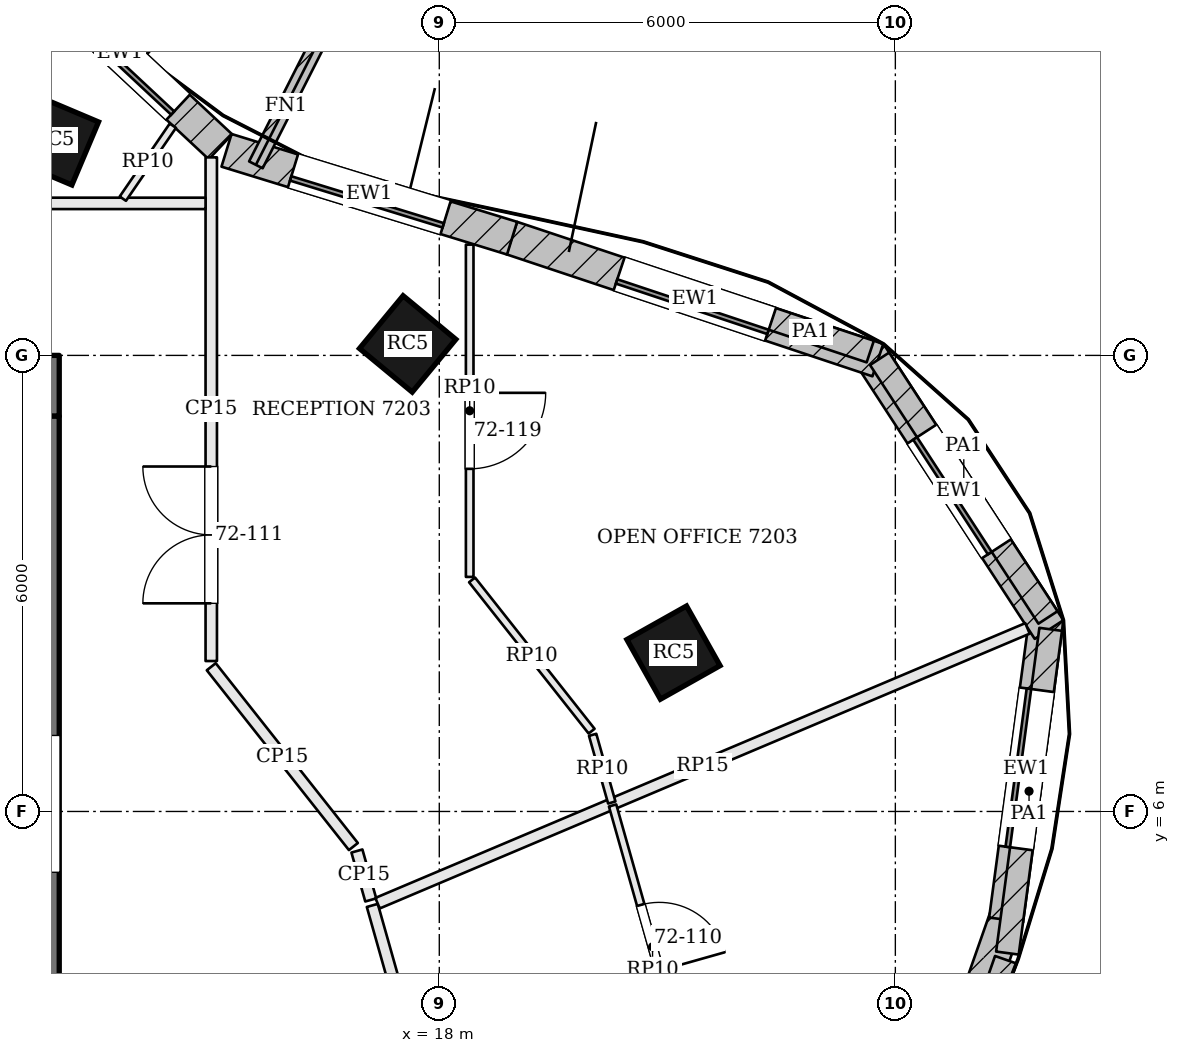
"""IFC4 building model, lengths in metres.
Left out: names, types, materials, properties, quantities, classifications, styles, units other than length and angle.
Written with IfcOpenShell. Run it as: python <this file> out.ifc"""

import sys

from ifc_helpers import new_model, si_unit, direction, frame, frame_2d, origin, origin_2d, place, context, subcontext, project, spatial, rectangle, extrude, element, fill, save


model = new_model("IFC4")
c1 = context("Model", 3, precision=1e-05, world=origin(), true_north=direction((0.0, 1.0)))
c2 = subcontext(c1, "Body", "Model", "MODEL_VIEW")
j1 = project(units=[si_unit("LENGTHUNIT", "METRE"), si_unit("PLANEANGLEUNIT", "RADIAN")], contexts=[c1])
p1 = place(None, origin())
s1 = spatial("IfcSite", under=j1, at=p1, CompositionType="ELEMENT")
p2 = place(p1, origin())
s2 = spatial("IfcBuilding", under=s1, at=p2, CompositionType="ELEMENT")
p3 = place(p2, frame((0.0, 0.0, 292.2)))
s3 = spatial("IfcBuildingStorey", under=s2, at=p3, CompositionType="ELEMENT", Elevation=292.2)
p4 = place(p3, frame((-13.0, 11.6, 0.0), z_axis=(0.0, 0.0, 1.0), x_axis=(1.0, 0.0, 0.0)))
e1 = element("IfcWall", 1, at=p4, inside=s3, PredefinedType="SHEAR", context=c2, shape_type="SweptSolid", body=[
    extrude(rectangle(XDim=26.0, YDim=0.8, at=frame_2d((13.0, 0.0))), origin(), (0.0, 0.0, 1.0), 3.9),
])
p5 = place(p4, frame((9.65, 0.0, 0.0)))
e2 = element("IfcOpeningElement", 2, at=p5, cuts=e1, PredefinedType="OPENING", context=c2, shape_type="SweptSolid", body=[
    extrude(rectangle(XDim=1.0, YDim=2.1, at=frame_2d((0.5, 1.05))), frame((0.0, 0.41, 0.0), z_axis=(0.0, -1.0, 0.0), x_axis=(1.0, 0.0, 0.0)), (0.0, 0.0, 1.0), 0.82),
])
p6 = place(p4, frame((12.675, 0.0, 0.0)))
e3 = element("IfcOpeningElement", 3, at=p6, cuts=e1, PredefinedType="OPENING", context=c2, shape_type="SweptSolid", body=[
    extrude(rectangle(XDim=0.7, YDim=2.1, at=frame_2d((0.35, 1.05))), frame((0.0, 0.41, 0.0), z_axis=(0.0, -1.0, 0.0), x_axis=(1.0, 0.0, 0.0)), (0.0, 0.0, 1.0), 0.82),
])
p7 = place(p4, frame((14.725, 0.0, 0.0)))
e4 = element("IfcOpeningElement", 4, at=p7, cuts=e1, PredefinedType="OPENING", context=c2, shape_type="SweptSolid", body=[
    extrude(rectangle(XDim=0.7, YDim=2.1, at=frame_2d((0.35, 1.05))), frame((0.0, 0.41, 0.0), z_axis=(0.0, -1.0, 0.0), x_axis=(1.0, 0.0, 0.0)), (0.0, 0.0, 1.0), 0.82),
])
p8 = place(p4, frame((16.6, 0.0, 0.0)))
e5 = element("IfcOpeningElement", 5, at=p8, cuts=e1, PredefinedType="OPENING", context=c2, shape_type="SweptSolid", body=[
    extrude(rectangle(XDim=1.0, YDim=2.1, at=frame_2d((0.5, 1.05))), frame((0.0, 0.41, 0.0), z_axis=(0.0, -1.0, 0.0), x_axis=(1.0, 0.0, 0.0)), (0.0, 0.0, 1.0), 0.82),
])
p9 = place(p3, frame((12.6, -2.2, 0.0), z_axis=(0.0, 0.0, 1.0), x_axis=(0.0, 1.0, 0.0)))
e6 = element("IfcWall", 6, at=p9, inside=s3, PredefinedType="SHEAR", context=c2, shape_type="SweptSolid", body=[
    extrude(rectangle(XDim=13.4, YDim=0.8, at=frame_2d((6.7, 0.0))), origin(), (0.0, 0.0, 1.0), 3.9),
])
p10 = place(p9, frame((7.4, 0.0, 0.0)))
e7 = element("IfcOpeningElement", 7, at=p10, cuts=e6, PredefinedType="OPENING", context=c2, shape_type="SweptSolid", body=[
    extrude(rectangle(XDim=1.8, YDim=2.1, at=frame_2d((0.9, 1.05))), frame((0.0, 0.41, 0.0), z_axis=(0.0, -1.0, 0.0), x_axis=(1.0, 0.0, 0.0)), (0.0, 0.0, 1.0), 0.82),
])
for number, where, z_axis, x_axis in (
    (8, (21.081, 8.09, 0.0), (0.0, 0.0, 1.0), (-0.49, 0.872, 0.0)),
    (9, (17.584, 12.151, 0.0), (0.0, 0.0, 1.0), (-0.771, 0.637, 0.0)),
    (10, (12.927, 14.832, 0.0), (0.0, 0.0, 1.0), (-0.921, 0.389, 0.0)),
):
    element("IfcColumn", number, at=place(p3, frame(where, z_axis=z_axis, x_axis=x_axis)), inside=s3, PredefinedType="COLUMN", context=c2, shape_type="SweptSolid", body=[
        extrude(rectangle(XDim=0.9, YDim=0.9, at=origin_2d()), origin(), (0.0, 0.0, 1.0), 3.9),
    ])
p11 = place(p3, frame((23.782, -0.189, 0.0), z_axis=(0.0, 0.0, 1.0), x_axis=(0.330794307703, 0.943702880144, 0.0)))
e11 = element("IfcWall", 11, at=p11, inside=s3, PredefinedType="SOLIDWALL", context=c2, shape_type="SweptSolid", body=[
    extrude(rectangle(XDim=5.095, YDim=0.45, at=frame_2d((2.548, 0.0))), origin(), (0.0, 0.0, 1.0), 3.7),
])
p12 = place(p11, frame((1.498, 0.0, 0.9)))
e12 = element("IfcOpeningElement", 12, at=p12, cuts=e11, PredefinedType="OPENING", context=c2, shape_type="SweptSolid", body=[
    extrude(rectangle(XDim=2.1, YDim=2.3, at=frame_2d((1.05, 1.15))), frame((0.0, 0.235, 0.0), z_axis=(0.0, -1.0, 0.0), x_axis=(1.0, 0.0, 0.0)), (0.0, 0.0, 1.0), 0.47),
])
p13 = place(p3, frame((25.457, 4.575, 0.0), z_axis=(0.0, 0.0, 1.0), x_axis=(0.132475046402, 0.991186340746, 0.0)))
e13 = element("IfcWall", 13, at=p13, inside=s3, PredefinedType="SOLIDWALL", context=c2, shape_type="SweptSolid", body=[
    extrude(rectangle(XDim=4.007, YDim=0.45, at=frame_2d((2.003, 0.0))), origin(), (0.0, 0.0, 1.0), 3.7),
])
p14 = place(p13, frame((0.953, 0.0, 0.9)))
e14 = element("IfcOpeningElement", 14, at=p14, cuts=e13, PredefinedType="OPENING", context=c2, shape_type="SweptSolid", body=[
    extrude(rectangle(XDim=2.1, YDim=2.3, at=frame_2d((1.05, 1.15))), frame((0.0, 0.235, 0.0), z_axis=(0.0, -1.0, 0.0), x_axis=(1.0, 0.0, 0.0)), (0.0, 0.0, 1.0), 0.47),
])
p15 = place(p3, frame((26.022, 8.393, 0.0), z_axis=(0.0, 0.0, 1.0), x_axis=(-0.545637310328, 0.838021435035, 0.0)))
e15 = element("IfcWall", 15, at=p15, inside=s3, PredefinedType="SOLIDWALL", context=c2, shape_type="SweptSolid", body=[
    extrude(rectangle(XDim=4.336, YDim=0.45, at=frame_2d((2.168, 0.0))), origin(), (0.0, 0.0, 1.0), 3.7),
])
p16 = place(p15, frame((1.268, 0.0, 0.9)))
e16 = element("IfcOpeningElement", 16, at=p16, cuts=e15, PredefinedType="OPENING", context=c2, shape_type="SweptSolid", body=[
    extrude(rectangle(XDim=1.8, YDim=2.3, at=frame_2d((0.9, 1.15))), frame((0.0, 0.235, 0.0), z_axis=(0.0, -1.0, 0.0), x_axis=(1.0, 0.0, 0.0)), (0.0, 0.0, 1.0), 0.47),
])
p17 = place(p3, frame((23.77, 11.938, 0.0), z_axis=(0.0, 0.0, 1.0), x_axis=(-0.948673679101, 0.316256621402, 0.0)))
e17 = element("IfcWall", 17, at=p17, inside=s3, PredefinedType="SOLIDWALL", context=c2, shape_type="SweptSolid", body=[
    extrude(rectangle(XDim=5.076, YDim=0.45, at=frame_2d((2.538, 0.0))), origin(), (0.0, 0.0, 1.0), 3.7),
])
p18 = place(p17, frame((1.488, 0.0, 0.9)))
e18 = element("IfcOpeningElement", 18, at=p18, cuts=e17, PredefinedType="OPENING", context=c2, shape_type="SweptSolid", body=[
    extrude(rectangle(XDim=2.1, YDim=2.3, at=frame_2d((1.05, 1.15))), frame((0.0, 0.235, 0.0), z_axis=(0.0, -1.0, 0.0), x_axis=(1.0, 0.0, 0.0)), (0.0, 0.0, 1.0), 0.47),
])
p19 = place(p3, frame((18.958, 13.542, 0.0), z_axis=(0.0, 0.0, 1.0), x_axis=(-0.955792437529, 0.294042201668, 0.0)))
e19 = element("IfcWall", 19, at=p19, inside=s3, PredefinedType="SOLIDWALL", context=c2, shape_type="SweptSolid", body=[
    extrude(rectangle(XDim=3.931, YDim=0.45, at=frame_2d((1.965, 0.0))), origin(), (0.0, 0.0, 1.0), 3.7),
])
p20 = place(p19, frame((0.915, 0.0, 0.9)))
e20 = element("IfcOpeningElement", 20, at=p20, cuts=e19, PredefinedType="OPENING", context=c2, shape_type="SweptSolid", body=[
    extrude(rectangle(XDim=2.1, YDim=2.3, at=frame_2d((1.05, 1.15))), frame((0.0, 0.235, 0.0), z_axis=(0.0, -1.0, 0.0), x_axis=(1.0, 0.0, 0.0)), (0.0, 0.0, 1.0), 0.47),
])
p21 = place(p3, frame((15.121, 14.745, 0.0), z_axis=(0.0, 0.0, 1.0), x_axis=(-0.730618259172, 0.68278617397, 0.0)))
e21 = element("IfcWall", 21, at=p21, inside=s3, PredefinedType="SOLIDWALL", context=c2, shape_type="SweptSolid", body=[
    extrude(rectangle(XDim=3.624, YDim=0.45, at=frame_2d((1.812, 0.0))), origin(), (0.0, 0.0, 1.0), 3.7),
])
p22 = place(p21, frame((0.762, 0.0, 0.9)))
e22 = element("IfcOpeningElement", 22, at=p22, cuts=e21, PredefinedType="OPENING", context=c2, shape_type="SweptSolid", body=[
    extrude(rectangle(XDim=2.1, YDim=2.3, at=frame_2d((1.05, 1.15))), frame((0.0, 0.235, 0.0), z_axis=(0.0, -1.0, 0.0), x_axis=(1.0, 0.0, 0.0)), (0.0, 0.0, 1.0), 0.47),
])
p23 = place(p3, frame((15.587, 14.507, 0.0), z_axis=(0.0, 0.0, 1.0), x_axis=(0.452117231361, 0.89195852432, 0.0)))
e23 = element("IfcWall", 23, at=p23, inside=s3, PredefinedType="SOLIDWALL", context=c2, shape_type="SweptSolid", body=[
    extrude(rectangle(XDim=1.75, YDim=0.2, at=frame_2d((0.875, 0.0))), origin(), (0.0, 0.0, 1.0), 3.7),
])
p24 = place(p3, frame((25.185, 3.285, 3.9), z_axis=(0.0, 0.0, 1.0), x_axis=(0.330927638021, 0.943656133554, 0.0)))
e24 = element("IfcWall", 24, at=p24, inside=s3, PredefinedType="PARAPET", context=c2, shape_type="SweptSolid", body=[
    extrude(rectangle(XDim=0.81, YDim=0.3, at=frame_2d((0.405, 0.0))), origin(), (0.0, 0.0, 1.0), 1.1),
])
p25 = place(p3, frame((25.474, 4.137, 3.9), z_axis=(0.0, 0.0, 1.0), x_axis=(0.132506125812, 0.991182186393, 0.0)))
e25 = element("IfcWall", 25, at=p25, inside=s3, PredefinedType="PARAPET", context=c2, shape_type="SweptSolid", body=[
    extrude(rectangle(XDim=4.297, YDim=0.3, at=frame_2d((2.148, 0.0))), origin(), (0.0, 0.0, 1.0), 1.1),
])
p26 = place(p3, frame((26.008, 8.552, 3.9), z_axis=(0.0, 0.0, 1.0), x_axis=(-0.545634876254, 0.83802301986, 0.0)))
e26 = element("IfcWall", 26, at=p26, inside=s3, PredefinedType="PARAPET", context=c2, shape_type="SweptSolid", body=[
    extrude(rectangle(XDim=4.061, YDim=0.3, at=frame_2d((2.03, 0.0))), origin(), (0.0, 0.0, 1.0), 1.1),
])
p27 = place(p3, frame((23.67, 12.05, 3.9), z_axis=(0.0, 0.0, 1.0), x_axis=(-0.948683298051, 0.316227766017, 0.0)))
e27 = element("IfcWall", 27, at=p27, inside=s3, PredefinedType="PARAPET", context=c2, shape_type="SweptSolid", body=[
    extrude(rectangle(XDim=1.655, YDim=0.3, at=frame_2d((0.827, 0.0))), origin(), (0.0, 0.0, 1.0), 1.1),
])
p28 = place(p3, frame((17.9, 2.0, 0.0), z_axis=(0.0, 0.0, 1.0), x_axis=(-0.271980959701, 0.962302633042, 0.0)))
e28 = element("IfcWall", 28, at=p28, inside=s3, PredefinedType="PARTITIONING", context=c2, shape_type="SweptSolid", body=[
    extrude(rectangle(XDim=2.873, YDim=0.15, at=frame_2d((1.436, 0.0))), origin(), (0.0, 0.0, 1.0), 3.198),
])
p29 = place(p3, frame((25.739, 8.408, 0.0), z_axis=(0.0, 0.0, 1.0), x_axis=(-0.92106014218, -0.389420357052, 0.0)))
e29 = element("IfcWall", 29, at=p29, inside=s3, PredefinedType="PARTITIONING", context=c2, shape_type="SweptSolid", body=[
    extrude(rectangle(XDim=9.284, YDim=0.15, at=frame_2d((4.642, 0.0))), origin(), (0.0, 0.0, 1.0), 3.234),
])
p30 = place(p3, frame((17.098, 4.836, 0.0), z_axis=(0.0, 0.0, 1.0), x_axis=(-0.271971703561, 0.962305249109, 0.0)))
e30 = element("IfcWall", 30, at=p30, inside=s3, PredefinedType="PARTITIONING", context=c2, shape_type="SweptSolid", body=[
    extrude(rectangle(XDim=0.669, YDim=0.15, at=frame_2d((0.334, 0.0))), origin(), (0.0, 0.0, 1.0), 3.198),
])
p31 = place(p3, frame((16.87, 5.539, 0.0), z_axis=(0.0, 0.0, 1.0), x_axis=(-0.620093074114, 0.784528252796, 0.0)))
e31 = element("IfcWall", 31, at=p31, inside=s3, PredefinedType="PARTITIONING", context=c2, shape_type="SweptSolid", body=[
    extrude(rectangle(XDim=3.015, YDim=0.15, at=frame_2d((1.508, 0.0))), origin(), (0.0, 0.0, 1.0), 3.198),
])
p32 = place(p3, frame((15.0, 7.979, 0.0), z_axis=(0.0, 0.0, 1.0), x_axis=(0.0, 1.0, 0.0)))
e32 = element("IfcWall", 32, at=p32, inside=s3, PredefinedType="PARTITIONING", context=c2, shape_type="SweptSolid", body=[
    extrude(rectangle(XDim=6.626, YDim=0.15, at=frame_2d((3.313, 0.0))), origin(), (0.0, 0.0, 1.0), 3.198),
])
p33 = place(p32, frame((0.759, 0.0, 0.0)))
e33 = element("IfcOpeningElement", 33, at=p33, cuts=e32, PredefinedType="OPENING", context=c2, shape_type="SweptSolid", body=[
    extrude(rectangle(XDim=1.8, YDim=2.1, at=frame_2d((0.9, 1.05))), frame((0.0, 0.085, 0.0), z_axis=(0.0, -1.0, 0.0), x_axis=(1.0, 0.0, 0.0)), (0.0, 0.0, 1.0), 0.17),
])
p34 = place(p3, frame((14.925, 14.0, 0.0), z_axis=(0.0, 0.0, 1.0), x_axis=(-1.0, 0.0, 0.0)))
e34 = element("IfcWall", 34, at=p34, inside=s3, PredefinedType="PARTITIONING", context=c2, shape_type="SweptSolid", body=[
    extrude(rectangle(XDim=11.827, YDim=0.15, at=frame_2d((5.914, 0.0))), origin(), (0.0, 0.0, 1.0), 3.198),
])
p35 = place(p34, frame((3.25, 0.0, 0.0)))
e35 = element("IfcOpeningElement", 35, at=p35, cuts=e34, PredefinedType="OPENING", context=c2, shape_type="SweptSolid", body=[
    extrude(rectangle(XDim=1.0, YDim=2.1, at=frame_2d((0.5, 1.05))), frame((0.0, 0.085, 0.0), z_axis=(0.0, -1.0, 0.0), x_axis=(1.0, 0.0, 0.0)), (0.0, 0.0, 1.0), 0.17),
])
p36 = place(p34, frame((8.55, 0.0, 0.0)))
e36 = element("IfcOpeningElement", 36, at=p36, cuts=e34, PredefinedType="OPENING", context=c2, shape_type="SweptSolid", body=[
    extrude(rectangle(XDim=1.0, YDim=2.1, at=frame_2d((0.5, 1.05))), frame((0.0, 0.085, 0.0), z_axis=(0.0, -1.0, 0.0), x_axis=(1.0, 0.0, 0.0)), (0.0, 0.0, 1.0), 0.17),
])
p37 = place(p3, frame((20.28, 6.079, 0.0), z_axis=(0.0, 0.0, 1.0), x_axis=(0.271974810721, -0.962304370942, 0.0)))
e37 = element("IfcWall", 37, at=p37, inside=s3, PredefinedType="PARTITIONING", context=c2, shape_type="SweptSolid", body=[
    extrude(rectangle(XDim=3.865, YDim=0.1, at=frame_2d((1.932, 0.0))), origin(), (0.0, 0.0, 1.0), 3.198),
])
p38 = place(p37, frame((1.36, 0.0, 0.0)))
e38 = element("IfcOpeningElement", 38, at=p38, cuts=e37, PredefinedType="OPENING", context=c2, shape_type="SweptSolid", body=[
    extrude(rectangle(XDim=0.9, YDim=2.1, at=frame_2d((0.45, 1.05))), frame((0.0, 0.06, 0.0), z_axis=(0.0, -1.0, 0.0), x_axis=(1.0, 0.0, 0.0)), (0.0, 0.0, 1.0), 0.12),
])
p39 = place(p3, frame((18.4, 13.458, 0.0), z_axis=(0.0, 0.0, 1.0), x_axis=(0.0, -1.0, 0.0)))
e39 = element("IfcWall", 39, at=p39, inside=s3, PredefinedType="PARTITIONING", context=c2, shape_type="SweptSolid", body=[
    extrude(rectangle(XDim=4.372, YDim=0.1, at=frame_2d((2.186, 0.0))), origin(), (0.0, 0.0, 1.0), 3.198),
])
p40 = place(p39, frame((1.95, 0.0, 0.0)))
e40 = element("IfcOpeningElement", 40, at=p40, cuts=e39, PredefinedType="OPENING", context=c2, shape_type="SweptSolid", body=[
    extrude(rectangle(XDim=1.0, YDim=2.1, at=frame_2d((0.5, 1.05))), frame((0.0, 0.06, 0.0), z_axis=(0.0, -1.0, 0.0), x_axis=(1.0, 0.0, 0.0)), (0.0, 0.0, 1.0), 0.12),
])
p41 = place(p3, frame((18.431, 9.046, 0.0), z_axis=(0.0, 0.0, 1.0), x_axis=(0.620118511479, -0.78450814637, 0.0)))
e41 = element("IfcWall", 41, at=p41, inside=s3, PredefinedType="PARTITIONING", context=c2, shape_type="SweptSolid", body=[
    extrude(rectangle(XDim=2.537, YDim=0.1, at=frame_2d((1.268, 0.0))), origin(), (0.0, 0.0, 1.0), 3.198),
])
p42 = place(p3, frame((20.018, 7.008, 0.0), z_axis=(0.0, 0.0, 1.0), x_axis=(0.272036681058, -0.962286882462, 0.0)))
e42 = element("IfcWall", 42, at=p42, inside=s3, PredefinedType="PARTITIONING", context=c2, shape_type="SweptSolid", body=[
    extrude(rectangle(XDim=0.925, YDim=0.1, at=frame_2d((0.463, 0.0))), origin(), (0.0, 0.0, 1.0), 3.198),
])
p43 = place(p3, frame((13.837, 14.062, 0.0), z_axis=(0.0, 0.0, 1.0), x_axis=(0.565495744886, 0.824751212497, 0.0)))
e43 = element("IfcWall", 43, at=p43, inside=s3, PredefinedType="PARTITIONING", context=c2, shape_type="SweptSolid", body=[
    extrude(rectangle(XDim=1.164, YDim=0.1, at=frame_2d((0.582, 0.0))), origin(), (0.0, 0.0, 1.0), 3.198),
])
p44 = place(p14, origin())
e44 = element("IfcWindow", 44, at=p44, inside=s3, PartitioningType="SINGLE_PANEL", PredefinedType="WINDOW", context=c2, shape_type="SweptSolid", body=[
    extrude(rectangle(XDim=2.1, YDim=2.3, at=frame_2d((1.05, 1.15))), frame((0.0, 0.135, 0.0), z_axis=(0.0, -1.0, 0.0), x_axis=(1.0, 0.0, 0.0)), (0.0, 0.0, 1.0), 0.06),
])
fill(e14, e44)
p45 = place(p16, origin())
e45 = element("IfcWindow", 45, at=p45, inside=s3, PartitioningType="SINGLE_PANEL", PredefinedType="WINDOW", context=c2, shape_type="SweptSolid", body=[
    extrude(rectangle(XDim=1.8, YDim=2.3, at=frame_2d((0.9, 1.15))), frame((0.0, 0.135, 0.0), z_axis=(0.0, -1.0, 0.0), x_axis=(1.0, 0.0, 0.0)), (0.0, 0.0, 1.0), 0.06),
])
fill(e16, e45)
p46 = place(p18, origin())
e46 = element("IfcWindow", 46, at=p46, inside=s3, PartitioningType="SINGLE_PANEL", PredefinedType="WINDOW", context=c2, shape_type="SweptSolid", body=[
    extrude(rectangle(XDim=2.1, YDim=2.3, at=frame_2d((1.05, 1.15))), frame((0.0, 0.135, 0.0), z_axis=(0.0, -1.0, 0.0), x_axis=(1.0, 0.0, 0.0)), (0.0, 0.0, 1.0), 0.06),
])
fill(e18, e46)
p47 = place(p20, origin())
e47 = element("IfcWindow", 47, at=p47, inside=s3, PartitioningType="SINGLE_PANEL", PredefinedType="WINDOW", context=c2, shape_type="SweptSolid", body=[
    extrude(rectangle(XDim=2.1, YDim=2.3, at=frame_2d((1.05, 1.15))), frame((0.0, 0.135, 0.0), z_axis=(0.0, -1.0, 0.0), x_axis=(1.0, 0.0, 0.0)), (0.0, 0.0, 1.0), 0.06),
])
fill(e20, e47)
p48 = place(p22, origin())
e48 = element("IfcWindow", 48, at=p48, inside=s3, PartitioningType="SINGLE_PANEL", PredefinedType="WINDOW", context=c2, shape_type="SweptSolid", body=[
    extrude(rectangle(XDim=2.1, YDim=2.3, at=frame_2d((1.05, 1.15))), frame((0.0, 0.135, 0.0), z_axis=(0.0, -1.0, 0.0), x_axis=(1.0, 0.0, 0.0)), (0.0, 0.0, 1.0), 0.06),
])
fill(e22, e48)
p49 = place(p38, origin())
e49 = element("IfcDoor", 49, at=p49, inside=s3, OperationType="SINGLE_SWING_RIGHT", PredefinedType="DOOR", context=c2, shape_type="SweptSolid", body=[
    extrude(rectangle(XDim=0.9, YDim=2.1, at=frame_2d((0.45, 1.05))), frame((0.0, 0.025, 0.0), z_axis=(0.0, -1.0, 0.0), x_axis=(1.0, 0.0, 0.0)), (0.0, 0.0, 1.0), 0.05),
])
fill(e38, e49)
p50 = place(p33, origin())
e50 = element("IfcDoor", 50, at=p50, inside=s3, OperationType="DOUBLE_DOOR_SINGLE_SWING", PredefinedType="DOOR", context=c2, shape_type="SweptSolid", body=[
    extrude(rectangle(XDim=1.8, YDim=2.1, at=frame_2d((0.9, 1.05))), frame((0.0, 0.025, 0.0), z_axis=(0.0, -1.0, 0.0), x_axis=(1.0, 0.0, 0.0)), (0.0, 0.0, 1.0), 0.05),
])
fill(e33, e50)
p51 = place(p40, origin())
e51 = element("IfcDoor", 51, at=p51, inside=s3, OperationType="SINGLE_SWING_LEFT", PredefinedType="DOOR", context=c2, shape_type="SweptSolid", body=[
    extrude(rectangle(XDim=1.0, YDim=2.1, at=frame_2d((0.5, 1.05))), frame((0.0, 0.025, 0.0), z_axis=(0.0, -1.0, 0.0), x_axis=(1.0, 0.0, 0.0)), (0.0, 0.0, 1.0), 0.05),
])
fill(e40, e51)
save(model, sys.argv[1])
